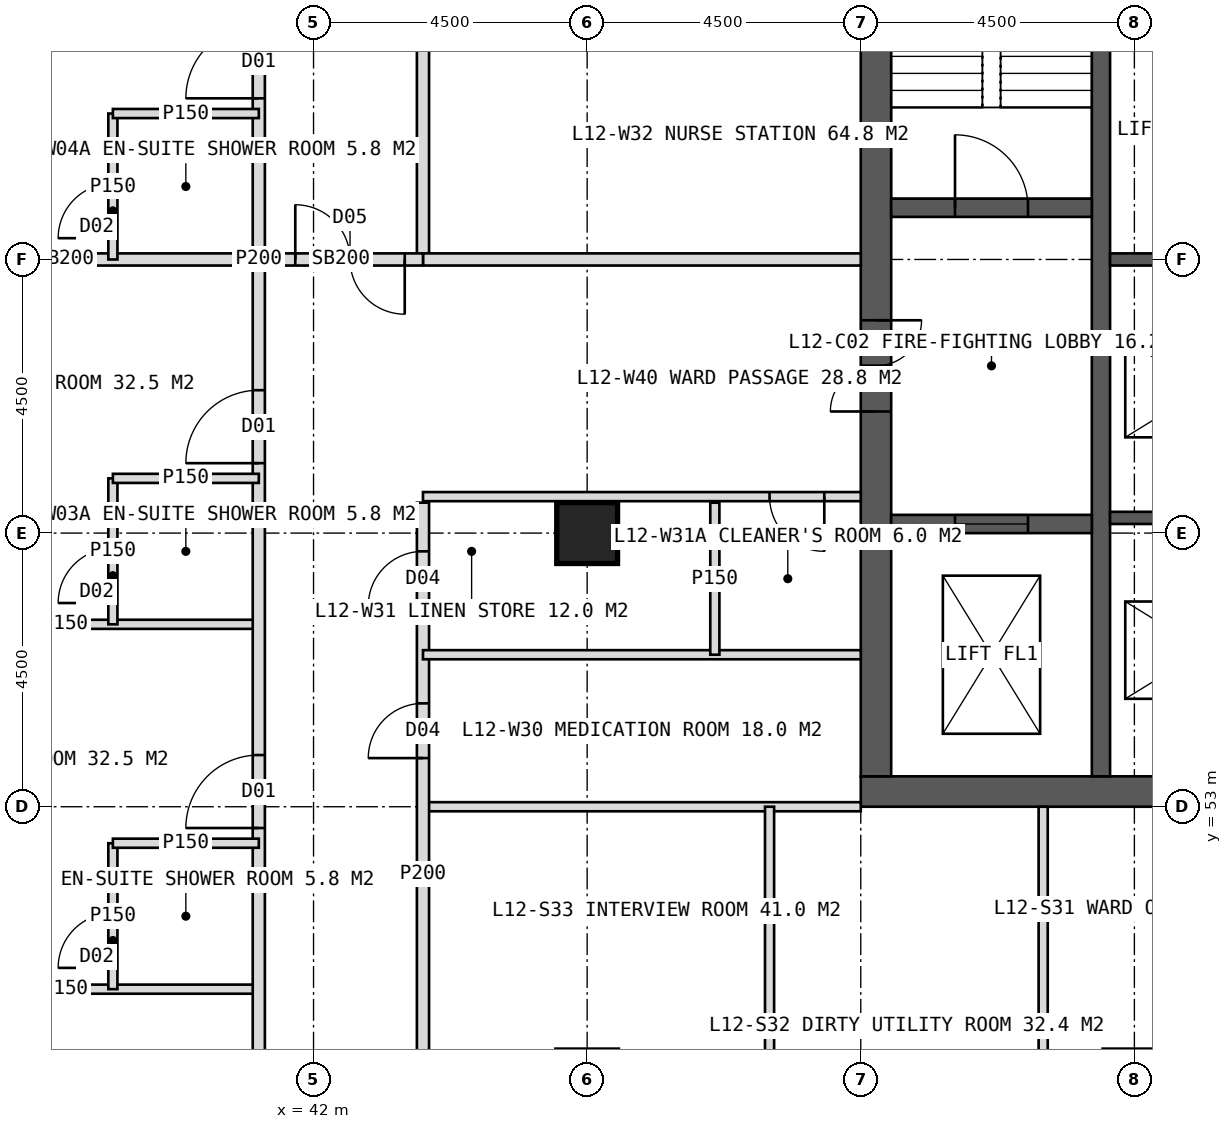
"""IFC4 building model, lengths in metres.
Left out: names, types, materials, properties, quantities, classifications, styles, units other than length and angle.
Written with IfcOpenShell. Run it as: python <this file> out.ifc"""

import sys

from ifc_helpers import new_model, si_unit, direction, frame, frame_2d, origin, origin_2d, place, context, subcontext, project, spatial, rectangle, hollow_rectangle, extrude, element, fill, save


model = new_model("IFC4")
c1 = context("Model", 3, precision=1e-05, world=origin(), true_north=direction((0.0, 1.0)))
c2 = subcontext(c1, "Body", "Model", "MODEL_VIEW")
j1 = project(units=[si_unit("LENGTHUNIT", "METRE"), si_unit("PLANEANGLEUNIT", "RADIAN")], contexts=[c1])
p1 = place(None, origin())
s1 = spatial("IfcSite", under=j1, at=p1, CompositionType="ELEMENT")
p2 = place(p1, origin())
s2 = spatial("IfcBuilding", under=s1, at=p2, CompositionType="ELEMENT")
p3 = place(p2, frame((0.0, 0.0, 55.0)))
s3 = spatial("IfcBuildingStorey", under=s2, at=p3, CompositionType="ELEMENT", Elevation=55.0)
p4 = place(p3, frame((51.0, 53.25, 0.0), z_axis=(0.0, 0.0, 1.0), x_axis=(1.0, 0.0, 0.0)))
e1 = element("IfcWall", 1, at=p4, inside=s3, PredefinedType="SHEAR", context=c2, shape_type="SweptSolid", body=[
    extrude(rectangle(XDim=18.0, YDim=0.5, at=frame_2d((9.0, 0.0))), origin(), (0.0, 0.0, 1.0), 4.0),
])
p5 = place(p4, frame((8.1, 0.0, 0.0)))
e2 = element("IfcOpeningElement", 2, at=p5, cuts=e1, PredefinedType="OPENING", context=c2, shape_type="SweptSolid", body=[
    extrude(rectangle(XDim=1.8, YDim=2.2, at=frame_2d((0.9, 1.1))), frame((0.0, 0.26, 0.0), z_axis=(0.0, -1.0, 0.0), x_axis=(1.0, 0.0, 0.0)), (0.0, 0.0, 1.0), 0.52),
])
p6 = place(p3, frame((51.25, 53.5, 0.0), z_axis=(0.0, 0.0, 1.0), x_axis=(0.0, 1.0, 0.0)))
e3 = element("IfcWall", 3, at=p6, inside=s3, PredefinedType="SHEAR", context=c2, shape_type="SweptSolid", body=[
    extrude(rectangle(XDim=17.0, YDim=0.5, at=frame_2d((8.5, 0.0))), origin(), (0.0, 0.0, 1.0), 4.0),
])
p7 = place(p6, frame((6.0, 0.0, 0.0)))
e4 = element("IfcOpeningElement", 4, at=p7, cuts=e3, PredefinedType="OPENING", context=c2, shape_type="SweptSolid", body=[
    extrude(rectangle(XDim=1.5, YDim=2.2, at=frame_2d((0.75, 1.1))), frame((0.0, 0.26, 0.0), z_axis=(0.0, -1.0, 0.0), x_axis=(1.0, 0.0, 0.0)), (0.0, 0.0, 1.0), 0.52),
])
p8 = place(p3, frame((54.95, 53.5, 0.0), z_axis=(0.0, 0.0, 1.0), x_axis=(0.0, 1.0, 0.0)))
e5 = element("IfcWall", 5, at=p8, inside=s3, PredefinedType="SHEAR", context=c2, shape_type="SweptSolid", body=[
    extrude(rectangle(XDim=17.0, YDim=0.3, at=frame_2d((8.5, 0.0))), origin(), (0.0, 0.0, 1.0), 4.0),
])
for number, where, z_axis, x_axis in (
    (6, (55.1, 57.75, 0.0), (0.0, 0.0, 1.0), (1.0, 0.0, 0.0)),
    (7, (55.1, 62.0, 0.0), (0.0, 0.0, 1.0), (1.0, 0.0, 0.0)),
):
    element("IfcWall", number, at=place(p3, frame(where, z_axis=z_axis, x_axis=x_axis)), inside=s3, PredefinedType="SHEAR", context=c2, shape_type="SweptSolid", body=[
        extrude(rectangle(XDim=3.05, YDim=0.2, at=frame_2d((1.525, 0.0))), origin(), (0.0, 0.0, 1.0), 4.0),
    ])
p9 = place(p3, frame((51.5, 62.85, 0.0), z_axis=(0.0, 0.0, 1.0), x_axis=(1.0, 0.0, 0.0)))
e8 = element("IfcWall", 8, at=p9, inside=s3, PredefinedType="SHEAR", context=c2, shape_type="SweptSolid", body=[
    extrude(rectangle(XDim=3.3, YDim=0.3, at=frame_2d((1.65, 0.0))), origin(), (0.0, 0.0, 1.0), 4.0),
])
p10 = place(p9, frame((1.05, 0.0, 0.0)))
e9 = element("IfcOpeningElement", 9, at=p10, cuts=e8, PredefinedType="OPENING", context=c2, shape_type="SweptSolid", body=[
    extrude(rectangle(XDim=1.2, YDim=2.1, at=frame_2d((0.6, 1.05))), frame((0.0, 0.16, 0.0), z_axis=(0.0, -1.0, 0.0), x_axis=(1.0, 0.0, 0.0)), (0.0, 0.0, 1.0), 0.32),
])
p11 = place(p3, frame((51.5, 57.65, 0.0), z_axis=(0.0, 0.0, 1.0), x_axis=(1.0, 0.0, 0.0)))
e10 = element("IfcWall", 10, at=p11, inside=s3, PredefinedType="SHEAR", context=c2, shape_type="SweptSolid", body=[
    extrude(rectangle(XDim=3.3, YDim=0.3, at=frame_2d((1.65, 0.0))), origin(), (0.0, 0.0, 1.0), 4.0),
])
p12 = place(p11, frame((1.05, 0.0, 0.0)))
e11 = element("IfcOpeningElement", 11, at=p12, cuts=e10, PredefinedType="OPENING", context=c2, shape_type="SweptSolid", body=[
    extrude(rectangle(XDim=1.2, YDim=2.2, at=frame_2d((0.6, 1.1))), frame((0.0, 0.16, 0.0), z_axis=(0.0, -1.0, 0.0), x_axis=(1.0, 0.0, 0.0)), (0.0, 0.0, 1.0), 0.32),
])
p13 = place(p3, frame((46.5, 57.5, 0.0), z_axis=(0.0, 0.0, 1.0), x_axis=(1.0, 0.0, 0.0)))
e12 = element("IfcColumn", 12, at=p13, inside=s3, PredefinedType="COLUMN", context=c2, shape_type="SweptSolid", body=[
    extrude(hollow_rectangle(XDim=1.0, YDim=1.0, WallThickness=0.1, at=origin_2d()), origin(), (0.0, 0.0, 1.0), 4.0),
])
for number, where, z_axis, x_axis in (
    (13, (41.1, 50.0, 0.0), (0.0, 0.0, 1.0), (-1.0, 0.0, 0.0)),
    (14, (41.1, 56.0, 0.0), (0.0, 0.0, 1.0), (-1.0, 0.0, 0.0)),
):
    element("IfcWall", number, at=place(p3, frame(where, z_axis=z_axis, x_axis=x_axis)), inside=s3, PredefinedType="PARTITIONING", context=c2, shape_type="SweptSolid", body=[
        extrude(rectangle(XDim=6.375, YDim=0.15, at=frame_2d((3.188, 0.0))), origin(), (0.0, 0.0, 1.0), 3.75),
    ])
p14 = place(p3, frame((41.1, 62.0, 0.0), z_axis=(0.0, 0.0, 1.0), x_axis=(-1.0, 0.0, 0.0)))
e15 = element("IfcWall", 15, at=p14, inside=s3, PredefinedType="SOLIDWALL", context=c2, shape_type="SweptSolid", body=[
    extrude(rectangle(XDim=6.375, YDim=0.2, at=frame_2d((3.188, 0.0))), origin(), (0.0, 0.0, 1.0), 2.75),
])
p15 = place(p3, frame((41.1, 43.1, 0.0), z_axis=(0.0, 0.0, 1.0), x_axis=(0.0, 1.0, 0.0)))
e16 = element("IfcWall", 16, at=p15, inside=s3, PredefinedType="PARTITIONING", context=c2, shape_type="SweptSolid", body=[
    extrude(rectangle(XDim=37.8, YDim=0.2, at=frame_2d((18.9, 0.0))), origin(), (0.0, 0.0, 1.0), 3.75),
])
p16 = place(p15, frame((3.25, 0.0, 0.0)))
e17 = element("IfcOpeningElement", 17, at=p16, cuts=e16, PredefinedType="OPENING", context=c2, shape_type="SweptSolid", body=[
    extrude(rectangle(XDim=1.2, YDim=2.2, at=frame_2d((0.6, 1.1))), frame((0.0, 0.11, 0.0), z_axis=(0.0, -1.0, 0.0), x_axis=(1.0, 0.0, 0.0)), (0.0, 0.0, 1.0), 0.22),
])
p17 = place(p15, frame((9.55, 0.0, 0.0)))
e18 = element("IfcOpeningElement", 18, at=p17, cuts=e16, PredefinedType="OPENING", context=c2, shape_type="SweptSolid", body=[
    extrude(rectangle(XDim=1.2, YDim=2.2, at=frame_2d((0.6, 1.1))), frame((0.0, 0.11, 0.0), z_axis=(0.0, -1.0, 0.0), x_axis=(1.0, 0.0, 0.0)), (0.0, 0.0, 1.0), 0.22),
])
p18 = place(p15, frame((15.55, 0.0, 0.0)))
e19 = element("IfcOpeningElement", 19, at=p18, cuts=e16, PredefinedType="OPENING", context=c2, shape_type="SweptSolid", body=[
    extrude(rectangle(XDim=1.2, YDim=2.2, at=frame_2d((0.6, 1.1))), frame((0.0, 0.11, 0.0), z_axis=(0.0, -1.0, 0.0), x_axis=(1.0, 0.0, 0.0)), (0.0, 0.0, 1.0), 0.22),
])
p19 = place(p15, frame((21.55, 0.0, 0.0)))
e20 = element("IfcOpeningElement", 20, at=p19, cuts=e16, PredefinedType="OPENING", context=c2, shape_type="SweptSolid", body=[
    extrude(rectangle(XDim=1.2, YDim=2.2, at=frame_2d((0.6, 1.1))), frame((0.0, 0.11, 0.0), z_axis=(0.0, -1.0, 0.0), x_axis=(1.0, 0.0, 0.0)), (0.0, 0.0, 1.0), 0.22),
])
p20 = place(p15, frame((27.55, 0.0, 0.0)))
e21 = element("IfcOpeningElement", 21, at=p20, cuts=e16, PredefinedType="OPENING", context=c2, shape_type="SweptSolid", body=[
    extrude(rectangle(XDim=1.2, YDim=2.2, at=frame_2d((0.6, 1.1))), frame((0.0, 0.11, 0.0), z_axis=(0.0, -1.0, 0.0), x_axis=(1.0, 0.0, 0.0)), (0.0, 0.0, 1.0), 0.22),
])
p21 = place(p3, frame((38.7, 50.0, 0.0), z_axis=(0.0, 0.0, 1.0), x_axis=(0.0, 1.0, 0.0)))
e22 = element("IfcWall", 22, at=p21, inside=s3, PredefinedType="PARTITIONING", context=c2, shape_type="SweptSolid", body=[
    extrude(rectangle(XDim=2.4, YDim=0.15, at=frame_2d((1.2, 0.0))), origin(), (0.0, 0.0, 1.0), 3.75),
])
p22 = place(p21, frame((0.35, 0.0, 0.0)))
e23 = element("IfcOpeningElement", 23, at=p22, cuts=e22, PredefinedType="OPENING", context=c2, shape_type="SweptSolid", body=[
    extrude(rectangle(XDim=0.9, YDim=2.1, at=frame_2d((0.45, 1.05))), frame((0.0, 0.085, 0.0), z_axis=(0.0, -1.0, 0.0), x_axis=(1.0, 0.0, 0.0)), (0.0, 0.0, 1.0), 0.17),
])
p23 = place(p3, frame((41.1, 52.4, 0.0), z_axis=(0.0, 0.0, 1.0), x_axis=(-1.0, 0.0, 0.0)))
e24 = element("IfcWall", 24, at=p23, inside=s3, PredefinedType="PARTITIONING", context=c2, shape_type="SweptSolid", body=[
    extrude(rectangle(XDim=2.4, YDim=0.15, at=frame_2d((1.2, 0.0))), origin(), (0.0, 0.0, 1.0), 3.75),
])
p24 = place(p3, frame((38.7, 56.0, 0.0), z_axis=(0.0, 0.0, 1.0), x_axis=(0.0, 1.0, 0.0)))
e25 = element("IfcWall", 25, at=p24, inside=s3, PredefinedType="PARTITIONING", context=c2, shape_type="SweptSolid", body=[
    extrude(rectangle(XDim=2.4, YDim=0.15, at=frame_2d((1.2, 0.0))), origin(), (0.0, 0.0, 1.0), 3.75),
])
p25 = place(p24, frame((0.35, 0.0, 0.0)))
e26 = element("IfcOpeningElement", 26, at=p25, cuts=e25, PredefinedType="OPENING", context=c2, shape_type="SweptSolid", body=[
    extrude(rectangle(XDim=0.9, YDim=2.1, at=frame_2d((0.45, 1.05))), frame((0.0, 0.085, 0.0), z_axis=(0.0, -1.0, 0.0), x_axis=(1.0, 0.0, 0.0)), (0.0, 0.0, 1.0), 0.17),
])
p26 = place(p3, frame((41.1, 58.4, 0.0), z_axis=(0.0, 0.0, 1.0), x_axis=(-1.0, 0.0, 0.0)))
e27 = element("IfcWall", 27, at=p26, inside=s3, PredefinedType="PARTITIONING", context=c2, shape_type="SweptSolid", body=[
    extrude(rectangle(XDim=2.4, YDim=0.15, at=frame_2d((1.2, 0.0))), origin(), (0.0, 0.0, 1.0), 3.75),
])
p27 = place(p3, frame((38.7, 62.0, 0.0), z_axis=(0.0, 0.0, 1.0), x_axis=(0.0, 1.0, 0.0)))
e28 = element("IfcWall", 28, at=p27, inside=s3, PredefinedType="PARTITIONING", context=c2, shape_type="SweptSolid", body=[
    extrude(rectangle(XDim=2.4, YDim=0.15, at=frame_2d((1.2, 0.0))), origin(), (0.0, 0.0, 1.0), 3.75),
])
p28 = place(p27, frame((0.35, 0.0, 0.0)))
e29 = element("IfcOpeningElement", 29, at=p28, cuts=e28, PredefinedType="OPENING", context=c2, shape_type="SweptSolid", body=[
    extrude(rectangle(XDim=0.9, YDim=2.1, at=frame_2d((0.45, 1.05))), frame((0.0, 0.085, 0.0), z_axis=(0.0, -1.0, 0.0), x_axis=(1.0, 0.0, 0.0)), (0.0, 0.0, 1.0), 0.17),
])
p29 = place(p3, frame((41.1, 64.4, 0.0), z_axis=(0.0, 0.0, 1.0), x_axis=(-1.0, 0.0, 0.0)))
e30 = element("IfcWall", 30, at=p29, inside=s3, PredefinedType="PARTITIONING", context=c2, shape_type="SweptSolid", body=[
    extrude(rectangle(XDim=2.4, YDim=0.15, at=frame_2d((1.2, 0.0))), origin(), (0.0, 0.0, 1.0), 3.75),
])
p30 = place(p3, frame((51.0, 53.0, 0.0), z_axis=(0.0, 0.0, 1.0), x_axis=(-1.0, 0.0, 0.0)))
e31 = element("IfcWall", 31, at=p30, inside=s3, PredefinedType="PARTITIONING", context=c2, shape_type="SweptSolid", body=[
    extrude(rectangle(XDim=7.2, YDim=0.15, at=frame_2d((3.6, 0.0))), origin(), (0.0, 0.0, 1.0), 3.75),
])
p31 = place(p3, frame((43.8, 45.8, 0.0), z_axis=(0.0, 0.0, 1.0), x_axis=(0.0, 1.0, 0.0)))
e32 = element("IfcWall", 32, at=p31, inside=s3, PredefinedType="PARTITIONING", context=c2, shape_type="SweptSolid", body=[
    extrude(rectangle(XDim=12.2, YDim=0.2, at=frame_2d((6.1, 0.0))), origin(), (0.0, 0.0, 1.0), 3.75),
])
p32 = place(p31, frame((8.0, 0.0, 0.0)))
e33 = element("IfcOpeningElement", 33, at=p32, cuts=e32, PredefinedType="OPENING", context=c2, shape_type="SweptSolid", body=[
    extrude(rectangle(XDim=0.9, YDim=2.1, at=frame_2d((0.45, 1.05))), frame((0.0, 0.11, 0.0), z_axis=(0.0, -1.0, 0.0), x_axis=(1.0, 0.0, 0.0)), (0.0, 0.0, 1.0), 0.22),
])
p33 = place(p31, frame((10.5, 0.0, 0.0)))
e34 = element("IfcOpeningElement", 34, at=p33, cuts=e32, PredefinedType="OPENING", context=c2, shape_type="SweptSolid", body=[
    extrude(rectangle(XDim=0.9, YDim=2.1, at=frame_2d((0.45, 1.05))), frame((0.0, 0.11, 0.0), z_axis=(0.0, -1.0, 0.0), x_axis=(1.0, 0.0, 0.0)), (0.0, 0.0, 1.0), 0.22),
])
p34 = place(p3, frame((43.8, 62.0, 0.0), z_axis=(0.0, 0.0, 1.0), x_axis=(0.0, 1.0, 0.0)))
e35 = element("IfcWall", 35, at=p34, inside=s3, PredefinedType="PARTITIONING", context=c2, shape_type="SweptSolid", body=[
    extrude(rectangle(XDim=16.2, YDim=0.2, at=frame_2d((8.1, 0.0))), origin(), (0.0, 0.0, 1.0), 3.75),
])
p35 = place(p34, frame((4.0, 0.0, 0.0)))
e36 = element("IfcOpeningElement", 36, at=p35, cuts=e35, PredefinedType="OPENING", context=c2, shape_type="SweptSolid", body=[
    extrude(rectangle(XDim=1.0, YDim=2.1, at=frame_2d((0.5, 1.05))), frame((0.0, 0.11, 0.0), z_axis=(0.0, -1.0, 0.0), x_axis=(1.0, 0.0, 0.0)), (0.0, 0.0, 1.0), 0.22),
])
p36 = place(p34, frame((12.1, 0.0, 0.0)))
e37 = element("IfcOpeningElement", 37, at=p36, cuts=e35, PredefinedType="OPENING", context=c2, shape_type="SweptSolid", body=[
    extrude(rectangle(XDim=1.0, YDim=2.1, at=frame_2d((0.5, 1.05))), frame((0.0, 0.11, 0.0), z_axis=(0.0, -1.0, 0.0), x_axis=(1.0, 0.0, 0.0)), (0.0, 0.0, 1.0), 0.22),
])
p37 = place(p3, frame((51.0, 58.1, 0.0), z_axis=(0.0, 0.0, 1.0), x_axis=(-1.0, 0.0, 0.0)))
e38 = element("IfcWall", 38, at=p37, inside=s3, PredefinedType="PARTITIONING", context=c2, shape_type="SweptSolid", body=[
    extrude(rectangle(XDim=7.2, YDim=0.15, at=frame_2d((3.6, 0.0))), origin(), (0.0, 0.0, 1.0), 3.75),
])
p38 = place(p37, frame((0.6, 0.0, 0.0)))
e39 = element("IfcOpeningElement", 39, at=p38, cuts=e38, PredefinedType="OPENING", context=c2, shape_type="SweptSolid", body=[
    extrude(rectangle(XDim=0.9, YDim=2.1, at=frame_2d((0.45, 1.05))), frame((0.0, 0.085, 0.0), z_axis=(0.0, -1.0, 0.0), x_axis=(1.0, 0.0, 0.0)), (0.0, 0.0, 1.0), 0.17),
])
p39 = place(p3, frame((51.0, 62.0, 0.0), z_axis=(0.0, 0.0, 1.0), x_axis=(-1.0, 0.0, 0.0)))
e40 = element("IfcWall", 40, at=p39, inside=s3, PredefinedType="SOLIDWALL", context=c2, shape_type="SweptSolid", body=[
    extrude(rectangle(XDim=7.2, YDim=0.2, at=frame_2d((3.6, 0.0))), origin(), (0.0, 0.0, 1.0), 2.75),
])
p40 = place(p3, frame((51.0, 55.5, 0.0), z_axis=(0.0, 0.0, 1.0), x_axis=(-1.0, 0.0, 0.0)))
e41 = element("IfcWall", 41, at=p40, inside=s3, PredefinedType="PARTITIONING", context=c2, shape_type="SweptSolid", body=[
    extrude(rectangle(XDim=7.2, YDim=0.15, at=frame_2d((3.6, 0.0))), origin(), (0.0, 0.0, 1.0), 3.75),
])
p41 = place(p3, frame((48.6, 55.5, 0.0), z_axis=(0.0, 0.0, 1.0), x_axis=(0.0, 1.0, 0.0)))
e42 = element("IfcWall", 42, at=p41, inside=s3, PredefinedType="PARTITIONING", context=c2, shape_type="SweptSolid", body=[
    extrude(rectangle(XDim=2.5, YDim=0.15, at=frame_2d((1.25, 0.0))), origin(), (0.0, 0.0, 1.0), 3.75),
])
for number, where, z_axis, x_axis in (
    (43, (54.0, 53.0, 0.0), (0.0, 0.0, 1.0), (0.0, -1.0, 0.0)),
    (44, (49.5, 53.0, 0.0), (0.0, 0.0, 1.0), (0.0, -1.0, 0.0)),
):
    element("IfcWall", number, at=place(p3, frame(where, z_axis=z_axis, x_axis=x_axis)), inside=s3, PredefinedType="PARTITIONING", context=c2, shape_type="SweptSolid", body=[
        extrude(rectangle(XDim=7.2, YDim=0.15, at=frame_2d((3.6, 0.0))), origin(), (0.0, 0.0, 1.0), 3.75),
    ])
p42 = place(p3, frame((43.8, 62.0, 0.0), z_axis=(0.0, 0.0, 1.0), x_axis=(-1.0, 0.0, 0.0)))
e45 = element("IfcWall", 45, at=p42, inside=s3, PredefinedType="SOLIDWALL", context=c2, shape_type="SweptSolid", body=[
    extrude(rectangle(XDim=2.7, YDim=0.2, at=frame_2d((1.35, 0.0))), origin(), (0.0, 0.0, 1.0), 2.75),
])
p43 = place(p42, frame((0.3, 0.0, 0.0)))
e46 = element("IfcOpeningElement", 46, at=p43, cuts=e45, PredefinedType="OPENING", context=c2, shape_type="SweptSolid", body=[
    extrude(rectangle(XDim=1.8, YDim=2.2, at=frame_2d((0.9, 1.1))), frame((0.0, 0.11, 0.0), z_axis=(0.0, -1.0, 0.0), x_axis=(1.0, 0.0, 0.0)), (0.0, 0.0, 1.0), 0.22),
])
p44 = place(p17, origin())
e47 = element("IfcDoor", 47, at=p44, inside=s3, OperationType="SINGLE_SWING_LEFT", PredefinedType="DOOR", context=c2, shape_type="SweptSolid", body=[
    extrude(rectangle(XDim=1.2, YDim=2.2, at=frame_2d((0.6, 1.1))), frame((0.0, 0.025, 0.0), z_axis=(0.0, -1.0, 0.0), x_axis=(1.0, 0.0, 0.0)), (0.0, 0.0, 1.0), 0.05),
])
fill(e18, e47)
p45 = place(p22, origin())
e48 = element("IfcDoor", 48, at=p45, inside=s3, OperationType="SINGLE_SWING_LEFT", PredefinedType="DOOR", context=c2, shape_type="SweptSolid", body=[
    extrude(rectangle(XDim=0.9, YDim=2.1, at=frame_2d((0.45, 1.05))), frame((0.0, 0.025, 0.0), z_axis=(0.0, -1.0, 0.0), x_axis=(1.0, 0.0, 0.0)), (0.0, 0.0, 1.0), 0.05),
])
fill(e23, e48)
p46 = place(p18, origin())
e49 = element("IfcDoor", 49, at=p46, inside=s3, OperationType="SINGLE_SWING_LEFT", PredefinedType="DOOR", context=c2, shape_type="SweptSolid", body=[
    extrude(rectangle(XDim=1.2, YDim=2.2, at=frame_2d((0.6, 1.1))), frame((0.0, 0.025, 0.0), z_axis=(0.0, -1.0, 0.0), x_axis=(1.0, 0.0, 0.0)), (0.0, 0.0, 1.0), 0.05),
])
fill(e19, e49)
p47 = place(p25, origin())
e50 = element("IfcDoor", 50, at=p47, inside=s3, OperationType="SINGLE_SWING_LEFT", PredefinedType="DOOR", context=c2, shape_type="SweptSolid", body=[
    extrude(rectangle(XDim=0.9, YDim=2.1, at=frame_2d((0.45, 1.05))), frame((0.0, 0.025, 0.0), z_axis=(0.0, -1.0, 0.0), x_axis=(1.0, 0.0, 0.0)), (0.0, 0.0, 1.0), 0.05),
])
fill(e26, e50)
p48 = place(p19, origin())
e51 = element("IfcDoor", 51, at=p48, inside=s3, OperationType="SINGLE_SWING_LEFT", PredefinedType="DOOR", context=c2, shape_type="SweptSolid", body=[
    extrude(rectangle(XDim=1.2, YDim=2.2, at=frame_2d((0.6, 1.1))), frame((0.0, 0.025, 0.0), z_axis=(0.0, -1.0, 0.0), x_axis=(1.0, 0.0, 0.0)), (0.0, 0.0, 1.0), 0.05),
])
fill(e20, e51)
p49 = place(p28, origin())
e52 = element("IfcDoor", 52, at=p49, inside=s3, OperationType="SINGLE_SWING_LEFT", PredefinedType="DOOR", context=c2, shape_type="SweptSolid", body=[
    extrude(rectangle(XDim=0.9, YDim=2.1, at=frame_2d((0.45, 1.05))), frame((0.0, 0.025, 0.0), z_axis=(0.0, -1.0, 0.0), x_axis=(1.0, 0.0, 0.0)), (0.0, 0.0, 1.0), 0.05),
])
fill(e29, e52)
p50 = place(p32, origin())
e53 = element("IfcDoor", 53, at=p50, inside=s3, OperationType="SINGLE_SWING_LEFT", PredefinedType="DOOR", context=c2, shape_type="SweptSolid", body=[
    extrude(rectangle(XDim=0.9, YDim=2.1, at=frame_2d((0.45, 1.05))), frame((0.0, 0.025, 0.0), z_axis=(0.0, -1.0, 0.0), x_axis=(1.0, 0.0, 0.0)), (0.0, 0.0, 1.0), 0.05),
])
fill(e33, e53)
p51 = place(p38, origin())
e54 = element("IfcDoor", 54, at=p51, inside=s3, OperationType="SINGLE_SWING_LEFT", PredefinedType="DOOR", context=c2, shape_type="SweptSolid", body=[
    extrude(rectangle(XDim=0.9, YDim=2.1, at=frame_2d((0.45, 1.05))), frame((0.0, 0.025, 0.0), z_axis=(0.0, -1.0, 0.0), x_axis=(1.0, 0.0, 0.0)), (0.0, 0.0, 1.0), 0.05),
])
fill(e39, e54)
p52 = place(p33, origin())
e55 = element("IfcDoor", 55, at=p52, inside=s3, OperationType="SINGLE_SWING_LEFT", PredefinedType="DOOR", context=c2, shape_type="SweptSolid", body=[
    extrude(rectangle(XDim=0.9, YDim=2.1, at=frame_2d((0.45, 1.05))), frame((0.0, 0.025, 0.0), z_axis=(0.0, -1.0, 0.0), x_axis=(1.0, 0.0, 0.0)), (0.0, 0.0, 1.0), 0.05),
])
fill(e34, e55)
p53 = place(p43, origin())
e56 = element("IfcDoor", 56, at=p53, inside=s3, OperationType="DOUBLE_DOOR_DOUBLE_SWING", PredefinedType="DOOR", context=c2, shape_type="SweptSolid", body=[
    extrude(rectangle(XDim=1.8, YDim=2.2, at=frame_2d((0.9, 1.1))), frame((0.0, 0.025, 0.0), z_axis=(0.0, -1.0, 0.0), x_axis=(1.0, 0.0, 0.0)), (0.0, 0.0, 1.0), 0.05),
])
fill(e46, e56)
p54 = place(p7, origin())
e57 = element("IfcDoor", 57, at=p54, inside=s3, OperationType="DOUBLE_DOOR_SINGLE_SWING", PredefinedType="DOOR", context=c2, shape_type="SweptSolid", body=[
    extrude(rectangle(XDim=1.5, YDim=2.2, at=frame_2d((0.75, 1.1))), frame((0.0, 0.025, 0.0), z_axis=(0.0, -1.0, 0.0), x_axis=(1.0, 0.0, 0.0)), (0.0, 0.0, 1.0), 0.05),
])
fill(e4, e57)
p55 = place(p10, origin())
e58 = element("IfcDoor", 58, at=p55, inside=s3, OperationType="SINGLE_SWING_LEFT", PredefinedType="DOOR", context=c2, shape_type="SweptSolid", body=[
    extrude(rectangle(XDim=1.2, YDim=2.1, at=frame_2d((0.6, 1.05))), frame((0.0, 0.025, 0.0), z_axis=(0.0, -1.0, 0.0), x_axis=(1.0, 0.0, 0.0)), (0.0, 0.0, 1.0), 0.05),
])
fill(e9, e58)
p56 = place(p12, origin())
e59 = element("IfcDoor", 59, at=p56, inside=s3, OperationType="SLIDING_TO_LEFT", PredefinedType="DOOR", context=c2, shape_type="SweptSolid", body=[
    extrude(rectangle(XDim=1.2, YDim=2.2, at=frame_2d((0.6, 1.1))), frame((0.0, 0.025, 0.0), z_axis=(0.0, -1.0, 0.0), x_axis=(1.0, 0.0, 0.0)), (0.0, 0.0, 1.0), 0.05),
])
fill(e11, e59)
save(model, sys.argv[1])
